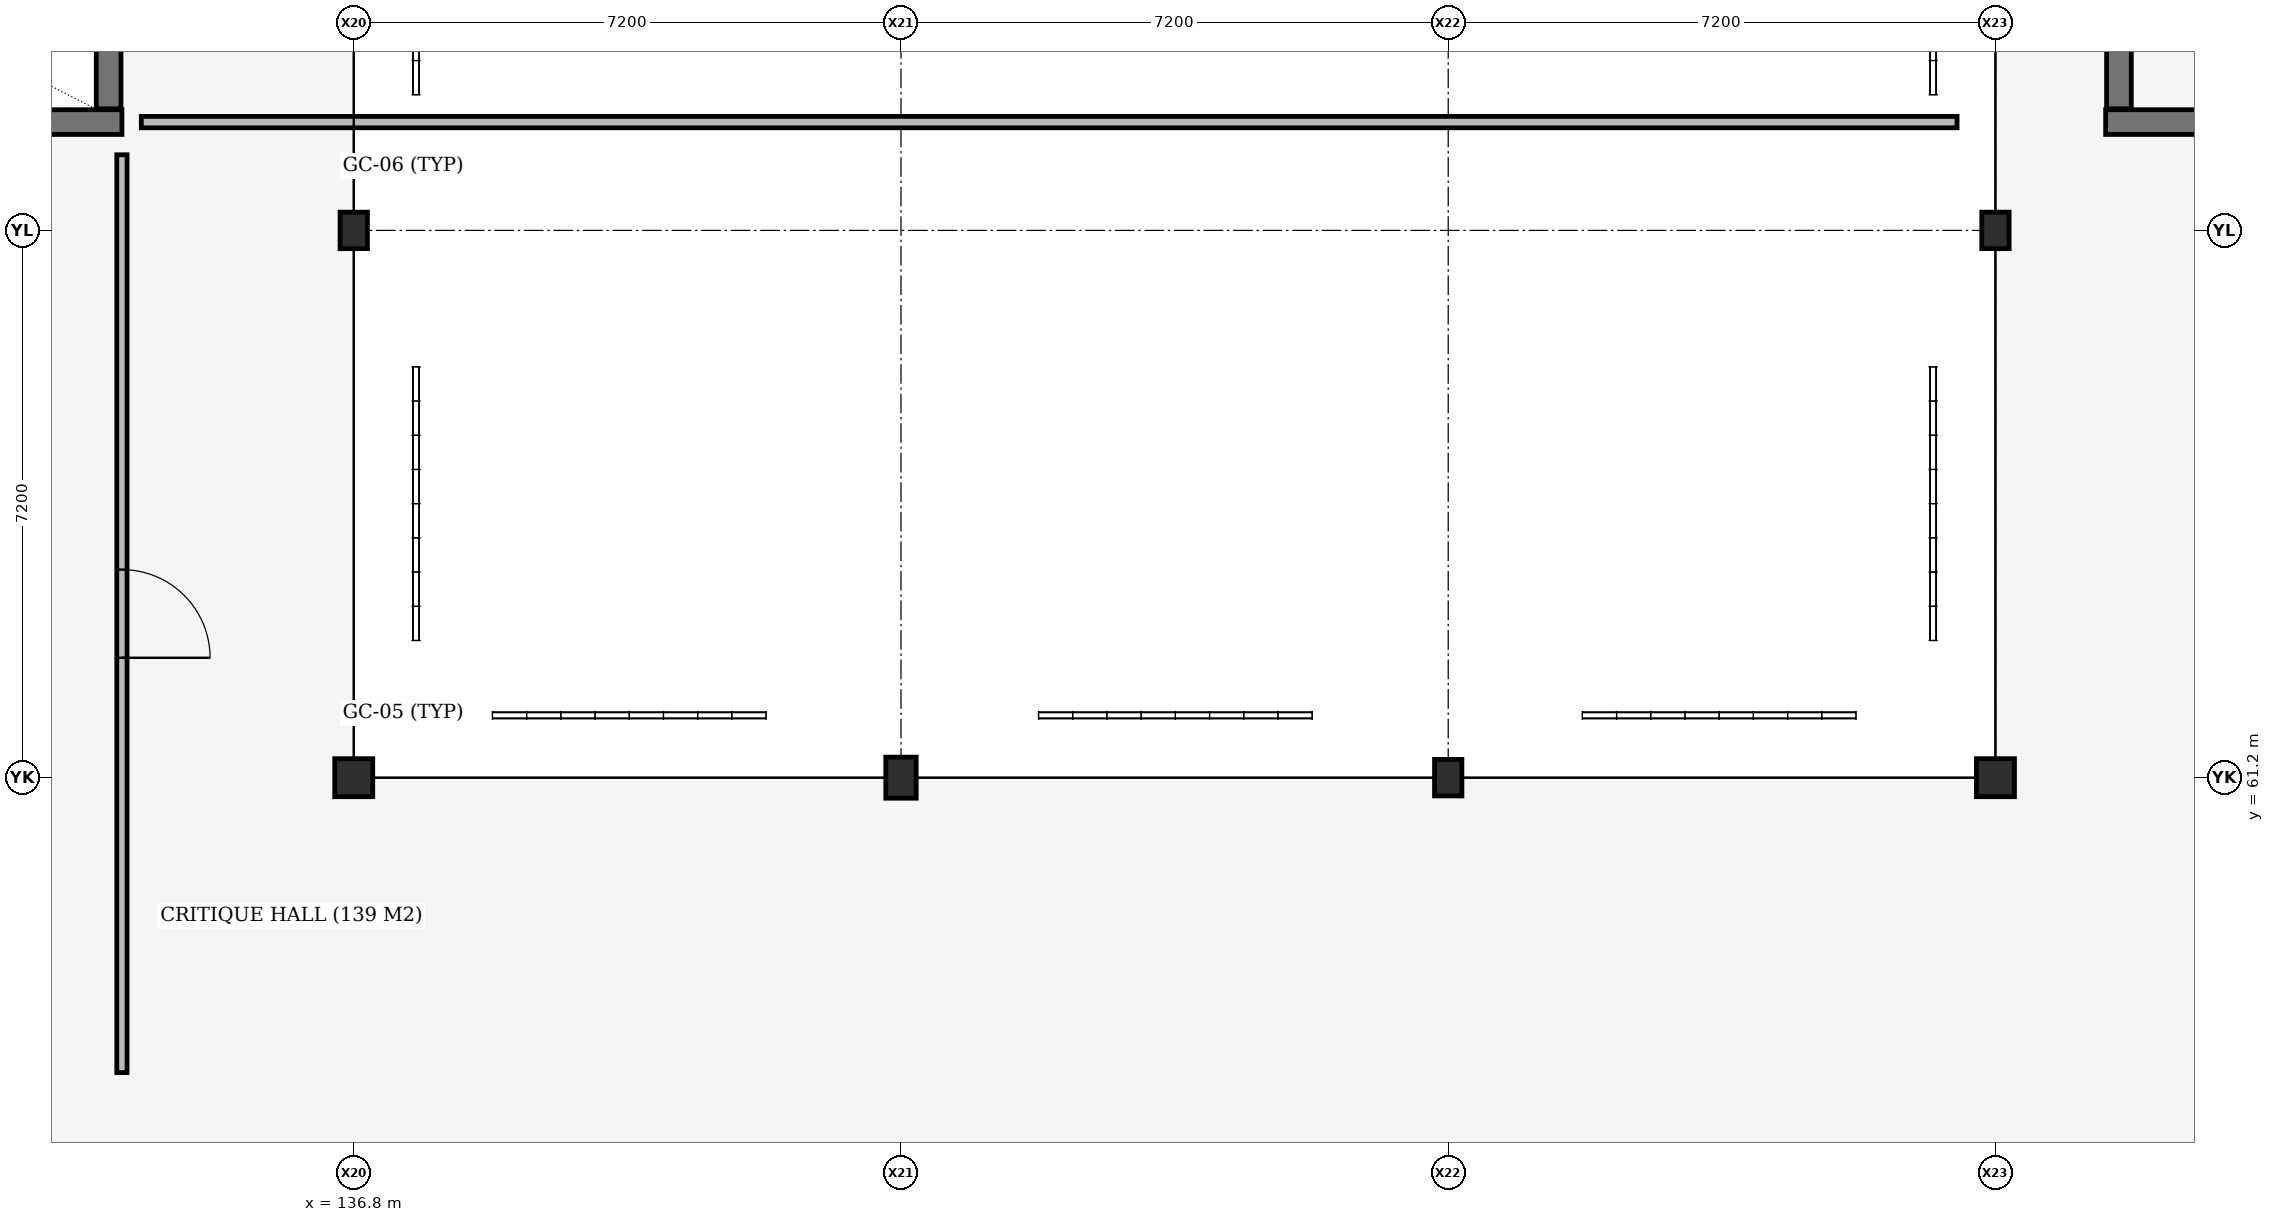
"""IFC4 building model, lengths in metres.
Left out: names, types, materials, properties, quantities, classifications, styles, units other than length and angle.
Written with IfcOpenShell. Run it as: python <this file> out.ifc"""

import sys

from ifc_helpers import new_model, si_unit, direction, frame, frame_2d, origin, origin_2d, place, context, subcontext, project, spatial, rectangle, extrude, element, fill, save


model = new_model("IFC4")
c1 = context("Model", 3, precision=1e-05, world=origin(), true_north=direction((0.0, 1.0)))
c2 = subcontext(c1, "Body", "Model", "MODEL_VIEW")
j1 = project(units=[si_unit("LENGTHUNIT", "METRE"), si_unit("PLANEANGLEUNIT", "RADIAN")], contexts=[c1])
p1 = place(None, origin())
s1 = spatial("IfcSite", under=j1, at=p1, CompositionType="ELEMENT")
p2 = place(p1, origin())
s2 = spatial("IfcBuilding", under=s1, at=p2, CompositionType="ELEMENT")
p3 = place(p2, frame((0.0, 0.0, 9.6)))
s3 = spatial("IfcBuildingStorey", under=s2, at=p3, CompositionType="ELEMENT", Elevation=9.6)
p4 = place(p3, frame((136.8, 61.2, 0.0), z_axis=(0.0, 0.0, 1.0), x_axis=(1.0, 0.0, 0.0)))
e1 = element("IfcColumn", 1, at=p4, inside=s3, PredefinedType="COLUMN", context=c2, shape_type="SweptSolid", body=[
    extrude(rectangle(XDim=0.5, YDim=0.5, at=origin_2d()), origin(), (0.0, 0.0, 1.0), 3.92),
])
p5 = place(p3, frame((136.8, 68.4, 0.0), z_axis=(0.0, 0.0, 1.0), x_axis=(1.0, 0.0, 0.0)))
e2 = element("IfcColumn", 2, at=p5, inside=s3, PredefinedType="COLUMN", context=c2, shape_type="SweptSolid", body=[
    extrude(rectangle(XDim=0.36, YDim=0.48, at=origin_2d()), origin(), (0.0, 0.0, 1.0), 3.92),
])
p6 = place(p3, frame((144.0, 61.2, 0.0), z_axis=(0.0, 0.0, 1.0), x_axis=(1.0, 0.0, 0.0)))
e3 = element("IfcColumn", 3, at=p6, inside=s3, PredefinedType="COLUMN", context=c2, shape_type="SweptSolid", body=[
    extrude(rectangle(XDim=0.4, YDim=0.54, at=origin_2d()), origin(), (0.0, 0.0, 1.0), 3.92),
])
p7 = place(p3, frame((151.2, 61.2, 0.0), z_axis=(0.0, 0.0, 1.0), x_axis=(1.0, 0.0, 0.0)))
e4 = element("IfcColumn", 4, at=p7, inside=s3, PredefinedType="COLUMN", context=c2, shape_type="SweptSolid", body=[
    extrude(rectangle(XDim=0.36, YDim=0.48, at=origin_2d()), origin(), (0.0, 0.0, 1.0), 3.92),
])
p8 = place(p3, frame((158.4, 61.2, 0.0), z_axis=(0.0, 0.0, 1.0), x_axis=(1.0, 0.0, 0.0)))
e5 = element("IfcColumn", 5, at=p8, inside=s3, PredefinedType="COLUMN", context=c2, shape_type="SweptSolid", body=[
    extrude(rectangle(XDim=0.5, YDim=0.5, at=origin_2d()), origin(), (0.0, 0.0, 1.0), 3.92),
])
p9 = place(p3, frame((158.4, 68.4, 0.0), z_axis=(0.0, 0.0, 1.0), x_axis=(1.0, 0.0, 0.0)))
e6 = element("IfcColumn", 6, at=p9, inside=s3, PredefinedType="COLUMN", context=c2, shape_type="SweptSolid", body=[
    extrude(rectangle(XDim=0.36, YDim=0.48, at=origin_2d()), origin(), (0.0, 0.0, 1.0), 3.92),
])
p10 = place(p3, frame((124.65, 69.825, 0.0), z_axis=(0.0, 0.0, 1.0), x_axis=(1.0, 0.0, 0.0)))
e7 = element("IfcWall", 7, at=p10, inside=s3, PredefinedType="SHEAR", context=c2, shape_type="SweptSolid", body=[
    extrude(rectangle(XDim=9.1, YDim=0.325, at=frame_2d((4.55, 0.0))), origin(), (0.0, 0.0, 1.0), 3.92),
])
p11 = place(p3, frame((133.575, 70.0, 0.0), z_axis=(0.0, 0.0, 1.0), x_axis=(0.0, 1.0, 0.0)))
e8 = element("IfcWall", 8, at=p11, inside=s3, PredefinedType="SHEAR", context=c2, shape_type="SweptSolid", body=[
    extrude(rectangle(XDim=3.45, YDim=0.325, at=frame_2d((1.725, 0.0))), origin(), (0.0, 0.0, 1.0), 3.92),
])
p12 = place(p3, frame((159.85, 69.825, 0.0), z_axis=(0.0, 0.0, 1.0), x_axis=(1.0, 0.0, 0.0)))
e9 = element("IfcWall", 9, at=p12, inside=s3, PredefinedType="SHEAR", context=c2, shape_type="SweptSolid", body=[
    extrude(rectangle(XDim=9.1, YDim=0.325, at=frame_2d((4.55, 0.0))), origin(), (0.0, 0.0, 1.0), 3.92),
])
p13 = place(p3, frame((160.025, 73.45, 0.0), z_axis=(0.0, 0.0, 1.0), x_axis=(0.0, -1.0, 0.0)))
e10 = element("IfcWall", 10, at=p13, inside=s3, PredefinedType="SHEAR", context=c2, shape_type="SweptSolid", body=[
    extrude(rectangle(XDim=3.45, YDim=0.325, at=frame_2d((1.725, 0.0))), origin(), (0.0, 0.0, 1.0), 3.92),
])
p14 = place(p13, frame((1.035, 0.0, 0.0)))
e11 = element("IfcOpeningElement", 11, at=p14, cuts=e10, PredefinedType="OPENING", context=c2, shape_type="SweptSolid", body=[
    extrude(rectangle(XDim=1.38, YDim=2.2, at=frame_2d((0.69, 1.1))), frame((0.0, 0.172, 0.0), z_axis=(0.0, -1.0, 0.0), x_axis=(1.0, 0.0, 0.0)), (0.0, 0.0, 1.0), 0.345),
])
p15 = place(p3, frame((133.75, 57.32, 0.0), z_axis=(0.0, 0.0, 1.0), x_axis=(0.0, 1.0, 0.0)))
e12 = element("IfcWall", 12, at=p15, inside=s3, PredefinedType="PARTITIONING", context=c2, shape_type="SweptSolid", body=[
    extrude(rectangle(XDim=12.075, YDim=0.135, at=frame_2d((6.038, 0.0))), origin(), (0.0, 0.0, 1.0), 3.24),
])
p16 = place(p15, frame((5.458, 0.0, 0.0)))
e13 = element("IfcOpeningElement", 13, at=p16, cuts=e12, PredefinedType="OPENING", context=c2, shape_type="SweptSolid", body=[
    extrude(rectangle(XDim=1.16, YDim=2.2, at=frame_2d((0.58, 1.1))), frame((0.0, 0.077, 0.0), z_axis=(0.0, -1.0, 0.0), x_axis=(1.0, 0.0, 0.0)), (0.0, 0.0, 1.0), 0.155),
])
p17 = place(p3, frame((134.005, 69.825, 0.0), z_axis=(0.0, 0.0, 1.0), x_axis=(1.0, 0.0, 0.0)))
e14 = element("IfcWall", 14, at=p17, inside=s3, PredefinedType="PARTITIONING", context=c2, shape_type="SweptSolid", body=[
    extrude(rectangle(XDim=23.89, YDim=0.15, at=frame_2d((11.945, 0.0))), origin(), (0.0, 0.0, 1.0), 3.24),
])
p18 = place(p16, origin())
e15 = element("IfcDoor", 15, at=p18, inside=s3, OperationType="SINGLE_SWING_RIGHT", PredefinedType="DOOR", context=c2, shape_type="SweptSolid", body=[
    extrude(rectangle(XDim=1.16, YDim=2.2, at=frame_2d((0.58, 1.1))), frame((0.0, 0.025, 0.0), z_axis=(0.0, -1.0, 0.0), x_axis=(1.0, 0.0, 0.0)), (0.0, 0.0, 1.0), 0.05),
])
fill(e13, e15)
save(model, sys.argv[1])
